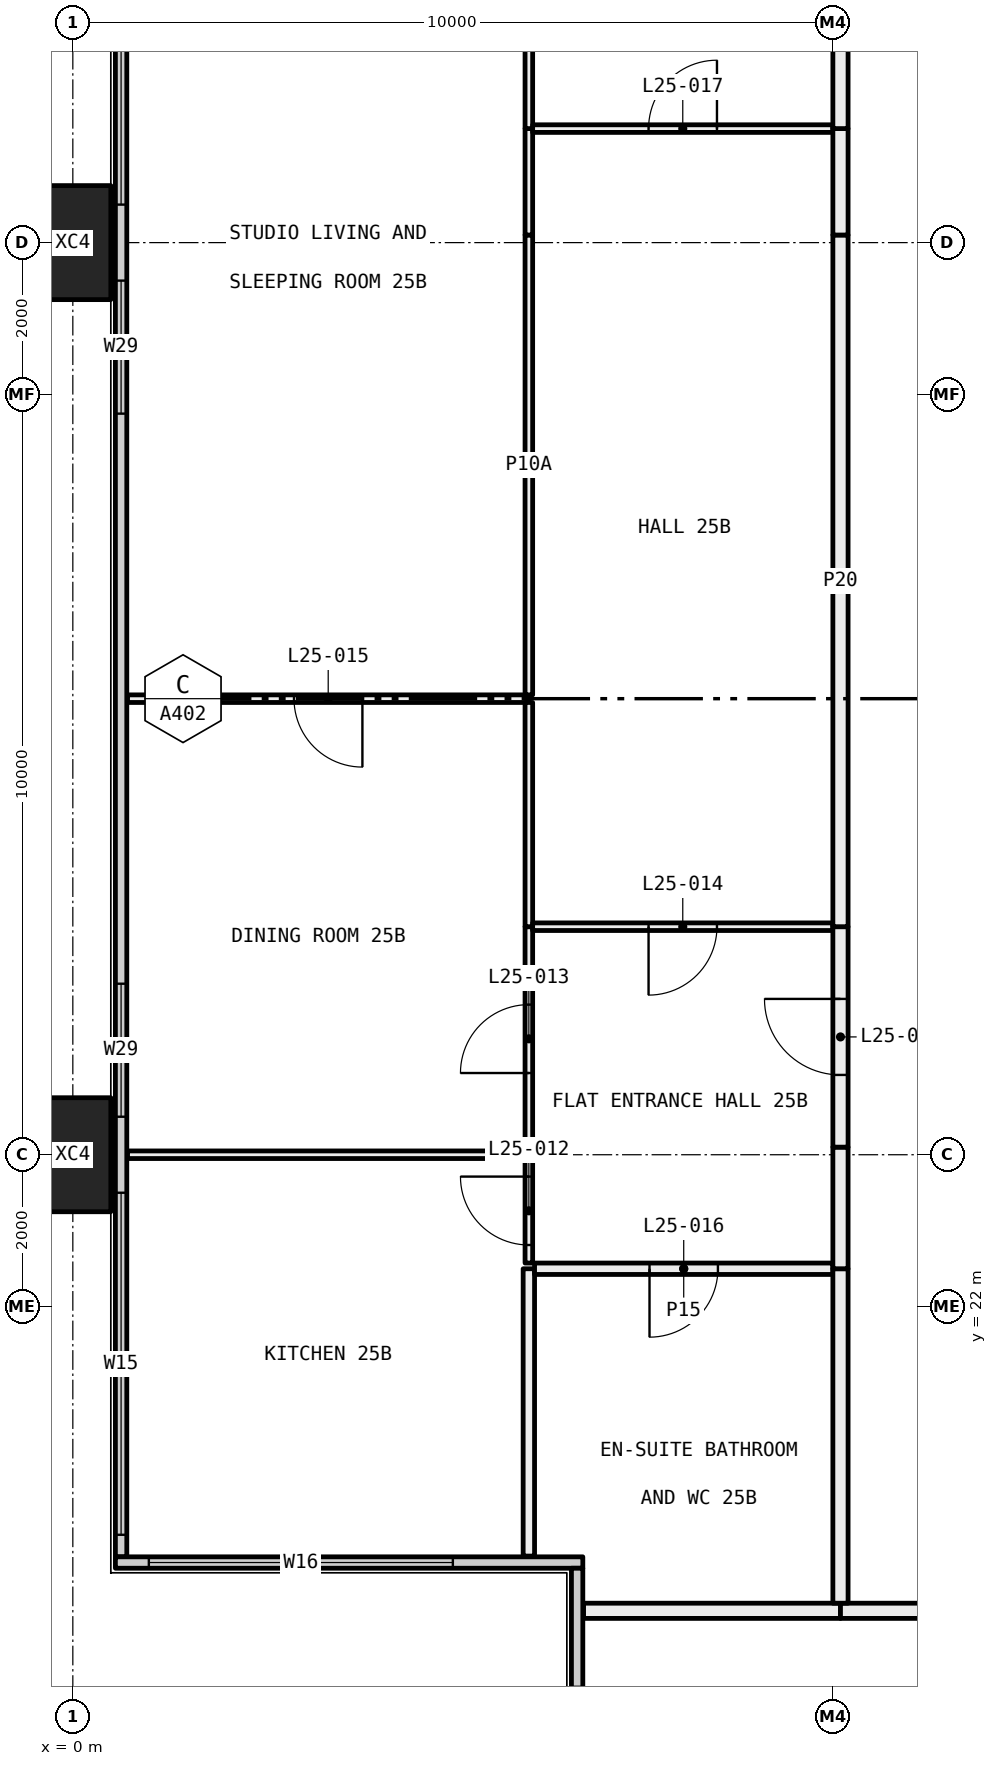
"""IFC4 building model, lengths in metres.
Left out: names, types, materials, properties, quantities, classifications, styles, units other than length and angle.
Written with IfcOpenShell. Run it as: python <this file> out.ifc"""

import sys

from ifc_helpers import new_model, si_unit, direction, frame, frame_2d, origin, origin_2d, place, context, subcontext, project, spatial, rectangle, hollow_rectangle, extrude, element, fill, save


model = new_model("IFC4")
c1 = context("Model", 3, precision=1e-05, world=origin(), true_north=direction((0.0, 1.0)))
c2 = subcontext(c1, "Body", "Model", "MODEL_VIEW")
j1 = project(units=[si_unit("LENGTHUNIT", "METRE"), si_unit("PLANEANGLEUNIT", "RADIAN")], contexts=[c1])
p1 = place(None, origin())
s1 = spatial("IfcSite", under=j1, at=p1, CompositionType="ELEMENT")
p2 = place(p1, origin())
s2 = spatial("IfcBuilding", under=s1, at=p2, CompositionType="ELEMENT")
p3 = place(p2, frame((0.0, 0.0, 100.05)))
s3 = spatial("IfcBuildingStorey", under=s2, at=p3, CompositionType="ELEMENT", Elevation=100.05)
for number, where, z_axis, x_axis in (
    (1, (0.0, 24.0, -0.4), (0.0, 0.0, 1.0), (0.0, 1.0, 0.0)),
    (2, (0.0, 36.0, -0.4), (0.0, 0.0, 1.0), (0.0, 1.0, 0.0)),
):
    element("IfcColumn", number, at=place(p3, frame(where, z_axis=z_axis, x_axis=x_axis)), inside=s3, PredefinedType="COLUMN", context=c2, shape_type="SweptSolid", body=[
        extrude(hollow_rectangle(XDim=1.5, YDim=1.0, WallThickness=0.06, at=origin_2d()), origin(), (0.0, 0.0, 1.0), 3.45),
    ])
p4 = place(p3, frame((0.635, 18.71, 0.0), z_axis=(0.0, 0.0, 1.0), x_axis=(0.0, 1.0, 0.0)))
e3 = element("IfcWall", 3, at=p4, inside=s3, PredefinedType="ELEMENTEDWALL", context=c2, shape_type="SweptSolid", body=[
    extrude(rectangle(XDim=22.58, YDim=0.15, at=frame_2d((11.29, 0.0))), origin(), (0.0, 0.0, 1.0), 3.05),
])
p5 = place(p4, frame((0.29, 0.0, 0.45)))
e4 = element("IfcOpeningElement", 4, at=p5, cuts=e3, PredefinedType="OPENING", context=c2, shape_type="SweptSolid", body=[
    extrude(rectangle(XDim=4.5, YDim=2.55, at=frame_2d((2.25, 1.275))), frame((0.0, 0.085, 0.0), z_axis=(0.0, -1.0, 0.0), x_axis=(1.0, 0.0, 0.0)), (0.0, 0.0, 1.0), 0.17),
])
p6 = place(p4, frame((5.79, 0.0, 0.45)))
e5 = element("IfcOpeningElement", 5, at=p6, cuts=e3, PredefinedType="OPENING", context=c2, shape_type="SweptSolid", body=[
    extrude(rectangle(XDim=1.75, YDim=2.55, at=frame_2d((0.875, 1.275))), frame((0.0, 0.085, 0.0), z_axis=(0.0, -1.0, 0.0), x_axis=(1.0, 0.0, 0.0)), (0.0, 0.0, 1.0), 0.17),
])
p7 = place(p4, frame((15.04, 0.0, 0.45)))
e6 = element("IfcOpeningElement", 6, at=p7, cuts=e3, PredefinedType="OPENING", context=c2, shape_type="SweptSolid", body=[
    extrude(rectangle(XDim=1.75, YDim=2.55, at=frame_2d((0.875, 1.275))), frame((0.0, 0.085, 0.0), z_axis=(0.0, -1.0, 0.0), x_axis=(1.0, 0.0, 0.0)), (0.0, 0.0, 1.0), 0.17),
])
p8 = place(p4, frame((17.79, 0.0, 0.45)))
e7 = element("IfcOpeningElement", 7, at=p8, cuts=e3, PredefinedType="OPENING", context=c2, shape_type="SweptSolid", body=[
    extrude(rectangle(XDim=4.5, YDim=2.55, at=frame_2d((2.25, 1.275))), frame((0.0, 0.085, 0.0), z_axis=(0.0, -1.0, 0.0), x_axis=(1.0, 0.0, 0.0)), (0.0, 0.0, 1.0), 0.17),
])
p9 = place(p3, frame((0.56, 18.635, 0.0), z_axis=(0.0, 0.0, 1.0), x_axis=(1.0, 0.0, 0.0)))
e8 = element("IfcWall", 8, at=p9, inside=s3, PredefinedType="ELEMENTEDWALL", context=c2, shape_type="SweptSolid", body=[
    extrude(rectangle(XDim=6.15, YDim=0.15, at=frame_2d((3.075, 0.0))), origin(), (0.0, 0.0, 1.0), 3.05),
])
p10 = place(p9, frame((0.44, 0.0, 0.45)))
e9 = element("IfcOpeningElement", 9, at=p10, cuts=e8, PredefinedType="OPENING", context=c2, shape_type="SweptSolid", body=[
    extrude(rectangle(XDim=4.0, YDim=2.55, at=frame_2d((2.0, 1.275))), frame((0.0, 0.085, 0.0), z_axis=(0.0, -1.0, 0.0), x_axis=(1.0, 0.0, 0.0)), (0.0, 0.0, 1.0), 0.17),
])
p11 = place(p3, frame((6.635, 12.71, 0.0), z_axis=(0.0, 0.0, 1.0), x_axis=(0.0, 1.0, 0.0)))
e10 = element("IfcWall", 10, at=p11, inside=s3, PredefinedType="ELEMENTEDWALL", context=c2, shape_type="SweptSolid", body=[
    extrude(rectangle(XDim=5.85, YDim=0.15, at=frame_2d((2.925, 0.0))), origin(), (0.0, 0.0, 1.0), 3.05),
])
p12 = place(p11, frame((0.29, 0.0, 0.45)))
e11 = element("IfcOpeningElement", 11, at=p12, cuts=e10, PredefinedType="OPENING", context=c2, shape_type="SweptSolid", body=[
    extrude(rectangle(XDim=4.0, YDim=2.55, at=frame_2d((2.0, 1.275))), frame((0.0, 0.085, 0.0), z_axis=(0.0, -1.0, 0.0), x_axis=(1.0, 0.0, 0.0)), (0.0, 0.0, 1.0), 0.17),
])
p13 = place(p3, frame((10.1, 18.0, 0.0), z_axis=(0.0, 0.0, 1.0), x_axis=(-1.0, 0.0, 0.0)))
e12 = element("IfcWall", 12, at=p13, inside=s3, PredefinedType="PARTITIONING", context=c2, shape_type="SweptSolid", body=[
    extrude(rectangle(XDim=3.38, YDim=0.2, at=frame_2d((1.69, 0.0))), origin(), (0.0, 0.0, 1.0), 3.05),
])
p14 = place(p3, frame((12.0, 18.0, 0.0), z_axis=(0.0, 0.0, 1.0), x_axis=(-1.0, 0.0, 0.0)))
e13 = element("IfcWall", 13, at=p14, inside=s3, PredefinedType="PARTITIONING", context=c2, shape_type="SweptSolid", body=[
    extrude(rectangle(XDim=1.9, YDim=0.2, at=frame_2d((0.95, 0.0))), origin(), (0.0, 0.0, 1.0), 3.05),
])
p15 = place(p3, frame((6.0, 24.0, 0.0), z_axis=(0.0, 0.0, 1.0), x_axis=(-1.0, 0.0, 0.0)))
e14 = element("IfcWall", 14, at=p15, inside=s3, PredefinedType="PARTITIONING", context=c2, shape_type="SweptSolid", body=[
    extrude(rectangle(XDim=5.28, YDim=0.1, at=frame_2d((2.64, 0.0))), origin(), (0.0, 0.0, 1.0), 2.45),
])
p16 = place(p3, frame((6.0, 18.72, 0.0), z_axis=(0.0, 0.0, 1.0), x_axis=(0.0, 1.0, 0.0)))
e15 = element("IfcWall", 15, at=p16, inside=s3, PredefinedType="PARTITIONING", context=c2, shape_type="SweptSolid", body=[
    extrude(rectangle(XDim=3.78, YDim=0.15, at=frame_2d((1.89, 0.0))), origin(), (0.0, 0.0, 1.0), 3.05),
])
p17 = place(p3, frame((6.0, 22.575, 0.0), z_axis=(0.0, 0.0, 1.0), x_axis=(0.0, 1.0, 0.0)))
e16 = element("IfcWall", 16, at=p17, inside=s3, PredefinedType="PARTITIONING", context=c2, shape_type="SweptSolid", body=[
    extrude(rectangle(XDim=1.375, YDim=0.1, at=frame_2d((0.688, 0.0))), origin(), (0.0, 0.0, 1.0), 2.45),
])
p18 = place(p17, frame((0.238, 0.0, 0.0)))
e17 = element("IfcOpeningElement", 17, at=p18, cuts=e16, PredefinedType="OPENING", context=c2, shape_type="SweptSolid", body=[
    extrude(rectangle(XDim=0.9, YDim=2.1, at=frame_2d((0.45, 1.05))), frame((0.0, 0.06, 0.0), z_axis=(0.0, -1.0, 0.0), x_axis=(1.0, 0.0, 0.0)), (0.0, 0.0, 1.0), 0.12),
])
p19 = place(p3, frame((6.0, 30.0, 0.0), z_axis=(0.0, 0.0, 1.0), x_axis=(-1.0, 0.0, 0.0)))
e18 = element("IfcWall", 18, at=p19, inside=s3, PredefinedType="PARTITIONING", context=c2, shape_type="SweptSolid", body=[
    extrude(rectangle(XDim=5.28, YDim=0.1, at=frame_2d((2.64, 0.0))), origin(), (0.0, 0.0, 1.0), 3.05),
])
p20 = place(p19, frame((2.19, 0.0, 0.0)))
e19 = element("IfcOpeningElement", 19, at=p20, cuts=e18, PredefinedType="OPENING", context=c2, shape_type="SweptSolid", body=[
    extrude(rectangle(XDim=0.9, YDim=2.1, at=frame_2d((0.45, 1.05))), frame((0.0, 0.06, 0.0), z_axis=(0.0, -1.0, 0.0), x_axis=(1.0, 0.0, 0.0)), (0.0, 0.0, 1.0), 0.12),
])
p21 = place(p3, frame((6.0, 24.05, 0.0), z_axis=(0.0, 0.0, 1.0), x_axis=(0.0, 1.0, 0.0)))
e20 = element("IfcWall", 20, at=p21, inside=s3, PredefinedType="PARTITIONING", context=c2, shape_type="SweptSolid", body=[
    extrude(rectangle(XDim=2.95, YDim=0.1, at=frame_2d((1.475, 0.0))), origin(), (0.0, 0.0, 1.0), 2.45),
])
p22 = place(p21, frame((1.025, 0.0, 0.0)))
e21 = element("IfcOpeningElement", 21, at=p22, cuts=e20, PredefinedType="OPENING", context=c2, shape_type="SweptSolid", body=[
    extrude(rectangle(XDim=0.9, YDim=2.1, at=frame_2d((0.45, 1.05))), frame((0.0, 0.06, 0.0), z_axis=(0.0, -1.0, 0.0), x_axis=(1.0, 0.0, 0.0)), (0.0, 0.0, 1.0), 0.12),
])
p23 = place(p3, frame((6.0, 27.0, 0.0), z_axis=(0.0, 0.0, 1.0), x_axis=(0.0, 1.0, 0.0)))
e22 = element("IfcWall", 22, at=p23, inside=s3, PredefinedType="PARTITIONING", context=c2, shape_type="SweptSolid", body=[
    extrude(rectangle(XDim=2.95, YDim=0.1, at=frame_2d((1.475, 0.0))), origin(), (0.0, 0.0, 1.0), 3.05),
])
p24 = place(p3, frame((6.0, 30.05, 0.0), z_axis=(0.0, 0.0, 1.0), x_axis=(0.0, 1.0, 0.0)))
e23 = element("IfcWall", 23, at=p24, inside=s3, PredefinedType="PARTITIONING", context=c2, shape_type="SweptSolid", body=[
    extrude(rectangle(XDim=6.05, YDim=0.1, at=frame_2d((3.025, 0.0))), origin(), (0.0, 0.0, 1.0), 2.45),
])
p25 = place(p3, frame((6.0, 36.1, 0.0), z_axis=(0.0, 0.0, 1.0), x_axis=(0.0, 1.0, 0.0)))
e24 = element("IfcWall", 24, at=p25, inside=s3, PredefinedType="PARTITIONING", context=c2, shape_type="SweptSolid", body=[
    extrude(rectangle(XDim=1.4, YDim=0.1, at=frame_2d((0.7, 0.0))), origin(), (0.0, 0.0, 1.0), 3.05),
])
p26 = place(p3, frame((6.0, 37.5, 0.0), z_axis=(0.0, 0.0, 1.0), x_axis=(0.0, 1.0, 0.0)))
e25 = element("IfcWall", 25, at=p26, inside=s3, PredefinedType="PARTITIONING", context=c2, shape_type="SweptSolid", body=[
    extrude(rectangle(XDim=3.78, YDim=0.1, at=frame_2d((1.89, 0.0))), origin(), (0.0, 0.0, 1.0), 3.05),
])
p27 = place(p3, frame((10.0, 22.5, 0.0), z_axis=(0.0, 0.0, 1.0), x_axis=(-1.0, 0.0, 0.0)))
e26 = element("IfcWall", 26, at=p27, inside=s3, PredefinedType="PARTITIONING", context=c2, shape_type="SweptSolid", body=[
    extrude(rectangle(XDim=3.925, YDim=0.15, at=frame_2d((1.962, 0.0))), origin(), (0.0, 0.0, 1.0), 3.05),
])
p28 = place(p27, frame((1.512, 0.0, 0.0)))
e27 = element("IfcOpeningElement", 27, at=p28, cuts=e26, PredefinedType="OPENING", context=c2, shape_type="SweptSolid", body=[
    extrude(rectangle(XDim=0.9, YDim=2.1, at=frame_2d((0.45, 1.05))), frame((0.0, 0.085, 0.0), z_axis=(0.0, -1.0, 0.0), x_axis=(1.0, 0.0, 0.0)), (0.0, 0.0, 1.0), 0.17),
])
p29 = place(p3, frame((10.1, 18.1, 0.0), z_axis=(0.0, 0.0, 1.0), x_axis=(0.0, 1.0, 0.0)))
e28 = element("IfcWall", 28, at=p29, inside=s3, PredefinedType="PARTITIONING", context=c2, shape_type="SweptSolid", body=[
    extrude(rectangle(XDim=4.4, YDim=0.2, at=frame_2d((2.2, 0.0))), origin(), (0.0, 0.0, 1.0), 3.05),
])
p30 = place(p3, frame((10.0, 27.0, 0.0), z_axis=(0.0, 0.0, 1.0), x_axis=(-1.0, 0.0, 0.0)))
e29 = element("IfcWall", 29, at=p30, inside=s3, PredefinedType="PARTITIONING", context=c2, shape_type="SweptSolid", body=[
    extrude(rectangle(XDim=3.95, YDim=0.1, at=frame_2d((1.975, 0.0))), origin(), (0.0, 0.0, 1.0), 3.05),
])
p31 = place(p30, frame((1.525, 0.0, 0.0)))
e30 = element("IfcOpeningElement", 30, at=p31, cuts=e29, PredefinedType="OPENING", context=c2, shape_type="SweptSolid", body=[
    extrude(rectangle(XDim=0.9, YDim=2.1, at=frame_2d((0.45, 1.05))), frame((0.0, 0.06, 0.0), z_axis=(0.0, -1.0, 0.0), x_axis=(1.0, 0.0, 0.0)), (0.0, 0.0, 1.0), 0.12),
])
p32 = place(p3, frame((10.1, 22.5, 0.0), z_axis=(0.0, 0.0, 1.0), x_axis=(0.0, 1.0, 0.0)))
e31 = element("IfcWall", 31, at=p32, inside=s3, PredefinedType="PARTITIONING", context=c2, shape_type="SweptSolid", body=[
    extrude(rectangle(XDim=1.6, YDim=0.2, at=frame_2d((0.8, 0.0))), origin(), (0.0, 0.0, 1.0), 2.45),
])
p33 = place(p3, frame((10.1, 24.1, 0.0), z_axis=(0.0, 0.0, 1.0), x_axis=(0.0, 1.0, 0.0)))
e32 = element("IfcWall", 32, at=p33, inside=s3, PredefinedType="PARTITIONING", context=c2, shape_type="SweptSolid", body=[
    extrude(rectangle(XDim=2.9, YDim=0.2, at=frame_2d((1.45, 0.0))), origin(), (0.0, 0.0, 1.0), 3.05),
])
p34 = place(p33, frame((0.95, 0.0, 0.0)))
e33 = element("IfcOpeningElement", 33, at=p34, cuts=e32, PredefinedType="OPENING", context=c2, shape_type="SweptSolid", body=[
    extrude(rectangle(XDim=1.0, YDim=2.1, at=frame_2d((0.5, 1.05))), frame((0.0, 0.11, 0.0), z_axis=(0.0, -1.0, 0.0), x_axis=(1.0, 0.0, 0.0)), (0.0, 0.0, 1.0), 0.22),
])
p35 = place(p3, frame((10.0, 37.5, 0.0), z_axis=(0.0, 0.0, 1.0), x_axis=(-1.0, 0.0, 0.0)))
e34 = element("IfcWall", 34, at=p35, inside=s3, PredefinedType="PARTITIONING", context=c2, shape_type="SweptSolid", body=[
    extrude(rectangle(XDim=3.95, YDim=0.1, at=frame_2d((1.975, 0.0))), origin(), (0.0, 0.0, 1.0), 3.05),
])
p36 = place(p35, frame((1.525, 0.0, 0.0)))
e35 = element("IfcOpeningElement", 35, at=p36, cuts=e34, PredefinedType="OPENING", context=c2, shape_type="SweptSolid", body=[
    extrude(rectangle(XDim=0.9, YDim=2.1, at=frame_2d((0.45, 1.05))), frame((0.0, 0.06, 0.0), z_axis=(0.0, -1.0, 0.0), x_axis=(1.0, 0.0, 0.0)), (0.0, 0.0, 1.0), 0.12),
])
p37 = place(p3, frame((10.1, 27.0, 0.0), z_axis=(0.0, 0.0, 1.0), x_axis=(0.0, 1.0, 0.0)))
e36 = element("IfcWall", 36, at=p37, inside=s3, PredefinedType="PARTITIONING", context=c2, shape_type="SweptSolid", body=[
    extrude(rectangle(XDim=9.1, YDim=0.2, at=frame_2d((4.55, 0.0))), origin(), (0.0, 0.0, 1.0), 2.45),
])
p38 = place(p3, frame((10.1, 36.1, 0.0), z_axis=(0.0, 0.0, 1.0), x_axis=(0.0, 1.0, 0.0)))
e37 = element("IfcWall", 37, at=p38, inside=s3, PredefinedType="PARTITIONING", context=c2, shape_type="SweptSolid", body=[
    extrude(rectangle(XDim=1.4, YDim=0.2, at=frame_2d((0.7, 0.0))), origin(), (0.0, 0.0, 1.0), 3.05),
])
p39 = place(p3, frame((10.1, 37.5, 0.0), z_axis=(0.0, 0.0, 1.0), x_axis=(0.0, 1.0, 0.0)))
e38 = element("IfcWall", 38, at=p39, inside=s3, PredefinedType="PARTITIONING", context=c2, shape_type="SweptSolid", body=[
    extrude(rectangle(XDim=4.4, YDim=0.2, at=frame_2d((2.2, 0.0))), origin(), (0.0, 0.0, 1.0), 3.05),
])
p40 = place(p5, origin())
e39 = element("IfcWindow", 39, at=p40, inside=s3, PartitioningType="SINGLE_PANEL", PredefinedType="WINDOW", context=c2, shape_type="SweptSolid", body=[
    extrude(rectangle(XDim=4.5, YDim=2.55, at=frame_2d((2.25, 1.275))), frame((0.0, 0.03, 0.0), z_axis=(0.0, -1.0, 0.0), x_axis=(1.0, 0.0, 0.0)), (0.0, 0.0, 1.0), 0.06),
])
fill(e4, e39)
p41 = place(p6, origin())
e40 = element("IfcWindow", 40, at=p41, inside=s3, PartitioningType="SINGLE_PANEL", PredefinedType="WINDOW", context=c2, shape_type="SweptSolid", body=[
    extrude(rectangle(XDim=1.75, YDim=2.55, at=frame_2d((0.875, 1.275))), frame((0.0, 0.03, 0.0), z_axis=(0.0, -1.0, 0.0), x_axis=(1.0, 0.0, 0.0)), (0.0, 0.0, 1.0), 0.06),
])
fill(e5, e40)
p42 = place(p7, origin())
e41 = element("IfcWindow", 41, at=p42, inside=s3, PartitioningType="SINGLE_PANEL", PredefinedType="WINDOW", context=c2, shape_type="SweptSolid", body=[
    extrude(rectangle(XDim=1.75, YDim=2.55, at=frame_2d((0.875, 1.275))), frame((0.0, 0.03, 0.0), z_axis=(0.0, -1.0, 0.0), x_axis=(1.0, 0.0, 0.0)), (0.0, 0.0, 1.0), 0.06),
])
fill(e6, e41)
p43 = place(p8, origin())
e42 = element("IfcWindow", 42, at=p43, inside=s3, PartitioningType="SINGLE_PANEL", PredefinedType="WINDOW", context=c2, shape_type="SweptSolid", body=[
    extrude(rectangle(XDim=4.5, YDim=2.55, at=frame_2d((2.25, 1.275))), frame((0.0, 0.03, 0.0), z_axis=(0.0, -1.0, 0.0), x_axis=(1.0, 0.0, 0.0)), (0.0, 0.0, 1.0), 0.06),
])
fill(e7, e42)
p44 = place(p10, origin())
e43 = element("IfcWindow", 43, at=p44, inside=s3, PartitioningType="SINGLE_PANEL", PredefinedType="WINDOW", context=c2, shape_type="SweptSolid", body=[
    extrude(rectangle(XDim=4.0, YDim=2.55, at=frame_2d((2.0, 1.275))), frame((0.0, 0.03, 0.0), z_axis=(0.0, -1.0, 0.0), x_axis=(1.0, 0.0, 0.0)), (0.0, 0.0, 1.0), 0.06),
])
fill(e9, e43)
p45 = place(p34, origin())
e44 = element("IfcDoor", 44, at=p45, inside=s3, OperationType="SINGLE_SWING_LEFT", PredefinedType="DOOR", context=c2, shape_type="SweptSolid", body=[
    extrude(rectangle(XDim=1.0, YDim=2.1, at=frame_2d((0.5, 1.05))), frame((0.0, 0.025, 0.0), z_axis=(0.0, -1.0, 0.0), x_axis=(1.0, 0.0, 0.0)), (0.0, 0.0, 1.0), 0.05),
])
fill(e33, e44)
p46 = place(p18, origin())
e45 = element("IfcDoor", 45, at=p46, inside=s3, OperationType="SINGLE_SWING_LEFT", PredefinedType="DOOR", context=c2, shape_type="SweptSolid", body=[
    extrude(rectangle(XDim=0.9, YDim=2.1, at=frame_2d((0.45, 1.05))), frame((0.0, 0.025, 0.0), z_axis=(0.0, -1.0, 0.0), x_axis=(1.0, 0.0, 0.0)), (0.0, 0.0, 1.0), 0.05),
])
fill(e17, e45)
p47 = place(p22, origin())
e46 = element("IfcDoor", 46, at=p47, inside=s3, OperationType="SINGLE_SWING_RIGHT", PredefinedType="DOOR", context=c2, shape_type="SweptSolid", body=[
    extrude(rectangle(XDim=0.9, YDim=2.1, at=frame_2d((0.45, 1.05))), frame((0.0, 0.025, 0.0), z_axis=(0.0, -1.0, 0.0), x_axis=(1.0, 0.0, 0.0)), (0.0, 0.0, 1.0), 0.05),
])
fill(e21, e46)
p48 = place(p31, origin())
e47 = element("IfcDoor", 47, at=p48, inside=s3, OperationType="SINGLE_SWING_LEFT", PredefinedType="DOOR", context=c2, shape_type="SweptSolid", body=[
    extrude(rectangle(XDim=0.9, YDim=2.1, at=frame_2d((0.45, 1.05))), frame((0.0, 0.025, 0.0), z_axis=(0.0, -1.0, 0.0), x_axis=(1.0, 0.0, 0.0)), (0.0, 0.0, 1.0), 0.05),
])
fill(e30, e47)
p49 = place(p20, origin())
e48 = element("IfcDoor", 48, at=p49, inside=s3, OperationType="SINGLE_SWING_RIGHT", PredefinedType="DOOR", context=c2, shape_type="SweptSolid", body=[
    extrude(rectangle(XDim=0.9, YDim=2.1, at=frame_2d((0.45, 1.05))), frame((0.0, 0.025, 0.0), z_axis=(0.0, -1.0, 0.0), x_axis=(1.0, 0.0, 0.0)), (0.0, 0.0, 1.0), 0.05),
])
fill(e19, e48)
p50 = place(p28, origin())
e49 = element("IfcDoor", 49, at=p50, inside=s3, OperationType="SINGLE_SWING_LEFT", PredefinedType="DOOR", context=c2, shape_type="SweptSolid", body=[
    extrude(rectangle(XDim=0.9, YDim=2.1, at=frame_2d((0.45, 1.05))), frame((0.0, 0.025, 0.0), z_axis=(0.0, -1.0, 0.0), x_axis=(1.0, 0.0, 0.0)), (0.0, 0.0, 1.0), 0.05),
])
fill(e27, e49)
p51 = place(p36, frame((0.9, 0.0, 0.0), x_axis=(-1.0, 0.0, 0.0)))
e50 = element("IfcDoor", 50, at=p51, inside=s3, OperationType="SINGLE_SWING_LEFT", PredefinedType="DOOR", context=c2, shape_type="SweptSolid", body=[
    extrude(rectangle(XDim=0.9, YDim=2.1, at=frame_2d((0.45, 1.05))), frame((0.0, 0.025, 0.0), z_axis=(0.0, -1.0, 0.0), x_axis=(1.0, 0.0, 0.0)), (0.0, 0.0, 1.0), 0.05),
])
fill(e35, e50)
save(model, sys.argv[1])
